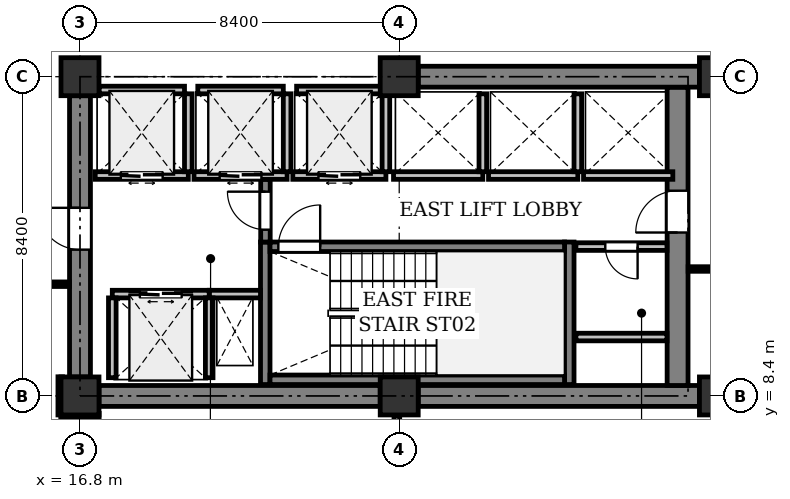
"""IFC4 building model, lengths in metres.
Left out: names, types, materials, properties, quantities, classifications, styles, units other than length and angle.
Written with IfcOpenShell. Run it as: python <this file> out.ifc"""

import sys

from ifc_helpers import new_model, si_unit, direction, frame, frame_2d, origin, origin_2d, place, context, subcontext, project, spatial, rectangle, extrude, element, fill, save


model = new_model("IFC4")
c1 = context("Model", 3, precision=1e-05, world=origin(), true_north=direction((0.0, 1.0)))
c2 = subcontext(c1, "Body", "Model", "MODEL_VIEW")
j1 = project(units=[si_unit("LENGTHUNIT", "METRE"), si_unit("PLANEANGLEUNIT", "RADIAN")], contexts=[c1])
p1 = place(None, origin())
s1 = spatial("IfcSite", under=j1, at=p1, CompositionType="ELEMENT")
p2 = place(p1, origin())
s2 = spatial("IfcBuilding", under=s1, at=p2, CompositionType="ELEMENT")
p3 = place(p2, frame((0.0, 0.0, 183.7)))
s3 = spatial("IfcBuildingStorey", under=s2, at=p3, CompositionType="ELEMENT", Elevation=183.7)
for number, where, z_axis, x_axis in (
    (1, (16.8, 8.4, 0.0), (0.0, 0.0, 1.0), (1.0, 0.0, 0.0)),
    (2, (16.8, 16.8, 0.0), (0.0, 0.0, 1.0), (1.0, 0.0, 0.0)),
    (3, (25.2, 8.4, 0.0), (0.0, 0.0, 1.0), (1.0, 0.0, 0.0)),
    (4, (25.2, 16.8, 0.0), (0.0, 0.0, 1.0), (1.0, 0.0, 0.0)),
    (5, (33.6, 8.4, 0.0), (0.0, 0.0, 1.0), (1.0, 0.0, 0.0)),
    (6, (33.6, 16.8, 0.0), (0.0, 0.0, 1.0), (1.0, 0.0, 0.0)),
):
    element("IfcColumn", number, at=place(p3, frame(where, z_axis=z_axis, x_axis=x_axis)), inside=s3, PredefinedType="COLUMN", context=c2, shape_type="SweptSolid", body=[
        extrude(rectangle(XDim=1.0, YDim=1.0, at=origin_2d()), origin(), (0.0, 0.0, 1.0), 4.1),
    ])
p4 = place(p3, frame((17.3, 8.4, 0.0), z_axis=(0.0, 0.0, 1.0), x_axis=(1.0, 0.0, 0.0)))
e7 = element("IfcWall", 7, at=p4, inside=s3, PredefinedType="SHEAR", context=c2, shape_type="SweptSolid", body=[
    extrude(rectangle(XDim=7.4, YDim=0.55, at=frame_2d((3.7, 0.0))), origin(), (0.0, 0.0, 1.0), 3.825),
])
p5 = place(p3, frame((25.7, 8.4, 0.0), z_axis=(0.0, 0.0, 1.0), x_axis=(1.0, 0.0, 0.0)))
e8 = element("IfcWall", 8, at=p5, inside=s3, PredefinedType="SHEAR", context=c2, shape_type="SweptSolid", body=[
    extrude(rectangle(XDim=7.4, YDim=0.55, at=frame_2d((3.7, 0.0))), origin(), (0.0, 0.0, 1.0), 3.825),
])
p6 = place(p3, frame((32.525, 8.675, 0.0), z_axis=(0.0, 0.0, 1.0), x_axis=(0.0, 1.0, 0.0)))
e9 = element("IfcWall", 9, at=p6, inside=s3, PredefinedType="SHEAR", context=c2, shape_type="SweptSolid", body=[
    extrude(rectangle(XDim=7.85, YDim=0.55, at=frame_2d((3.925, 0.0))), origin(), (0.0, 0.0, 1.0), 3.825),
])
p7 = place(p6, frame((4.025, 0.0, 0.0)))
e10 = element("IfcOpeningElement", 10, at=p7, cuts=e9, PredefinedType="OPENING", context=c2, shape_type="SweptSolid", body=[
    extrude(rectangle(XDim=1.1, YDim=2.15, at=frame_2d((0.55, 1.075))), frame((0.0, 0.285, 0.0), z_axis=(0.0, -1.0, 0.0), x_axis=(1.0, 0.0, 0.0)), (0.0, 0.0, 1.0), 0.57),
])
p8 = place(p3, frame((16.8, 8.9, 0.0), z_axis=(0.0, 0.0, 1.0), x_axis=(0.0, 1.0, 0.0)))
e11 = element("IfcWall", 11, at=p8, inside=s3, PredefinedType="SHEAR", context=c2, shape_type="SweptSolid", body=[
    extrude(rectangle(XDim=7.4, YDim=0.55, at=frame_2d((3.7, 0.0))), origin(), (0.0, 0.0, 1.0), 3.825),
])
p9 = place(p8, frame((3.35, 0.0, 0.0)))
e12 = element("IfcOpeningElement", 12, at=p9, cuts=e11, PredefinedType="OPENING", context=c2, shape_type="SweptSolid", body=[
    extrude(rectangle(XDim=1.1, YDim=2.15, at=frame_2d((0.55, 1.075))), frame((0.0, 0.285, 0.0), z_axis=(0.0, -1.0, 0.0), x_axis=(1.0, 0.0, 0.0)), (0.0, 0.0, 1.0), 0.57),
])
p10 = place(p3, frame((25.7, 16.8, 0.0), z_axis=(0.0, 0.0, 1.0), x_axis=(1.0, 0.0, 0.0)))
e13 = element("IfcWall", 13, at=p10, inside=s3, PredefinedType="SHEAR", context=c2, shape_type="SweptSolid", body=[
    extrude(rectangle(XDim=7.4, YDim=0.55, at=frame_2d((3.7, 0.0))), origin(), (0.0, 0.0, 1.0), 3.825),
])
for number, where, z_axis, x_axis in (
    (14, (21.675, 8.7, 0.0), (0.0, 0.0, 1.0), (0.0, 1.0, 0.0)),
    (15, (29.675, 8.7, 0.0), (0.0, 0.0, 1.0), (0.0, 1.0, 0.0)),
):
    element("IfcWall", number, at=place(p3, frame(where, z_axis=z_axis, x_axis=x_axis)), inside=s3, PredefinedType="SHEAR", context=c2, shape_type="SweptSolid", body=[
        extrude(rectangle(XDim=3.75, YDim=0.25, at=frame_2d((1.875, 0.0))), origin(), (0.0, 0.0, 1.0), 3.825),
    ])
p11 = place(p3, frame((21.8, 8.825, 0.0), z_axis=(0.0, 0.0, 1.0), x_axis=(1.0, 0.0, 0.0)))
e16 = element("IfcWall", 16, at=p11, inside=s3, PredefinedType="SHEAR", context=c2, shape_type="SweptSolid", body=[
    extrude(rectangle(XDim=7.75, YDim=0.25, at=frame_2d((3.875, 0.0))), origin(), (0.0, 0.0, 1.0), 3.825),
])
p12 = place(p3, frame((21.8, 12.325, 0.0), z_axis=(0.0, 0.0, 1.0), x_axis=(1.0, 0.0, 0.0)))
e17 = element("IfcWall", 17, at=p12, inside=s3, PredefinedType="SHEAR", context=c2, shape_type="SweptSolid", body=[
    extrude(rectangle(XDim=7.75, YDim=0.25, at=frame_2d((3.875, 0.0))), origin(), (0.0, 0.0, 1.0), 3.825),
])
p13 = place(p12, frame((0.22, 0.0, 0.0)))
e18 = element("IfcOpeningElement", 18, at=p13, cuts=e17, PredefinedType="OPENING", context=c2, shape_type="SweptSolid", body=[
    extrude(rectangle(XDim=1.1, YDim=2.15, at=frame_2d((0.55, 1.075))), frame((0.0, 0.135, 0.0), z_axis=(0.0, -1.0, 0.0), x_axis=(1.0, 0.0, 0.0)), (0.0, 0.0, 1.0), 0.27),
])
p14 = place(p3, frame((20.2, 11.08, 0.0), z_axis=(0.0, 0.0, 1.0), x_axis=(1.0, 0.0, 0.0)))
e19 = element("IfcWall", 19, at=p14, inside=s3, PredefinedType="PARTITIONING", context=c2, shape_type="SweptSolid", body=[
    extrude(rectangle(XDim=1.35, YDim=0.2, at=frame_2d((0.675, 0.0))), origin(), (0.0, 0.0, 1.0), 3.825),
])
p15 = place(p3, frame((21.68, 12.45, 0.0), z_axis=(0.0, 0.0, 1.0), x_axis=(0.0, 1.0, 0.0)))
e20 = element("IfcWall", 20, at=p15, inside=s3, PredefinedType="SHEAR", context=c2, shape_type="SweptSolid", body=[
    extrude(rectangle(XDim=1.65, YDim=0.25, at=frame_2d((0.825, 0.0))), origin(), (0.0, 0.0, 1.0), 3.825),
])
p16 = place(p15, frame((0.325, 0.0, 0.0)))
e21 = element("IfcOpeningElement", 21, at=p16, cuts=e20, PredefinedType="OPENING", context=c2, shape_type="SweptSolid", body=[
    extrude(rectangle(XDim=1.0, YDim=2.15, at=frame_2d((0.5, 1.075))), frame((0.0, 0.135, 0.0), z_axis=(0.0, -1.0, 0.0), x_axis=(1.0, 0.0, 0.0)), (0.0, 0.0, 1.0), 0.27),
])
p17 = place(p3, frame((17.65, 11.08, 0.0), z_axis=(0.0, 0.0, 1.0), x_axis=(1.0, 0.0, 0.0)))
e22 = element("IfcWall", 22, at=p17, inside=s3, PredefinedType="PARTITIONING", context=c2, shape_type="SweptSolid", body=[
    extrude(rectangle(XDim=2.55, YDim=0.2, at=frame_2d((1.275, 0.0))), origin(), (0.0, 0.0, 1.0), 3.825),
])
p18 = place(p17, frame((0.725, 0.0, 0.0)))
e23 = element("IfcOpeningElement", 23, at=p18, cuts=e22, PredefinedType="OPENING", context=c2, shape_type="SweptSolid", body=[
    extrude(rectangle(XDim=1.1, YDim=2.2, at=frame_2d((0.55, 1.1))), frame((0.0, 0.11, 0.0), z_axis=(0.0, -1.0, 0.0), x_axis=(1.0, 0.0, 0.0)), (0.0, 0.0, 1.0), 0.22),
])
for number, where, z_axis, x_axis in (
    (24, (20.2, 8.88, 0.0), (0.0, 0.0, 1.0), (0.0, 1.0, 0.0)),
    (25, (17.65, 8.88, 0.0), (0.0, 0.0, 1.0), (0.0, 1.0, 0.0)),
):
    element("IfcWall", number, at=place(p3, frame(where, z_axis=z_axis, x_axis=x_axis)), inside=s3, PredefinedType="PARTITIONING", context=c2, shape_type="SweptSolid", body=[
        extrude(rectangle(XDim=2.1, YDim=0.2, at=frame_2d((1.05, 0.0))), origin(), (0.0, 0.0, 1.0), 3.825),
    ])
p19 = place(p3, frame((17.2, 14.2, 0.0), z_axis=(0.0, 0.0, 1.0), x_axis=(1.0, 0.0, 0.0)))
e26 = element("IfcWall", 26, at=p19, inside=s3, PredefinedType="PARTITIONING", context=c2, shape_type="SweptSolid", body=[
    extrude(rectangle(XDim=2.45, YDim=0.2, at=frame_2d((1.225, 0.0))), origin(), (0.0, 0.0, 1.0), 3.825),
])
p20 = place(p19, frame((0.675, 0.0, 0.0)))
e27 = element("IfcOpeningElement", 27, at=p20, cuts=e26, PredefinedType="OPENING", context=c2, shape_type="SweptSolid", body=[
    extrude(rectangle(XDim=1.1, YDim=2.2, at=frame_2d((0.55, 1.1))), frame((0.0, 0.11, 0.0), z_axis=(0.0, -1.0, 0.0), x_axis=(1.0, 0.0, 0.0)), (0.0, 0.0, 1.0), 0.22),
])
p21 = place(p3, frame((19.65, 14.3, 0.0), z_axis=(0.0, 0.0, 1.0), x_axis=(0.0, 1.0, 0.0)))
e28 = element("IfcWall", 28, at=p21, inside=s3, PredefinedType="PARTITIONING", context=c2, shape_type="SweptSolid", body=[
    extrude(rectangle(XDim=2.05, YDim=0.2, at=frame_2d((1.025, 0.0))), origin(), (0.0, 0.0, 1.0), 3.825),
])
p22 = place(p3, frame((17.3, 16.45, 0.0), z_axis=(0.0, 0.0, 1.0), x_axis=(1.0, 0.0, 0.0)))
e29 = element("IfcWall", 29, at=p22, inside=s3, PredefinedType="PARTITIONING", context=c2, shape_type="SweptSolid", body=[
    extrude(rectangle(XDim=2.25, YDim=0.2, at=frame_2d((1.125, 0.0))), origin(), (0.0, 0.0, 1.0), 3.825),
])
p23 = place(p3, frame((19.8, 14.2, 0.0), z_axis=(0.0, 0.0, 1.0), x_axis=(1.0, 0.0, 0.0)))
e30 = element("IfcWall", 30, at=p23, inside=s3, PredefinedType="PARTITIONING", context=c2, shape_type="SweptSolid", body=[
    extrude(rectangle(XDim=2.45, YDim=0.2, at=frame_2d((1.225, 0.0))), origin(), (0.0, 0.0, 1.0), 3.825),
])
p24 = place(p23, frame((0.675, 0.0, 0.0)))
e31 = element("IfcOpeningElement", 31, at=p24, cuts=e30, PredefinedType="OPENING", context=c2, shape_type="SweptSolid", body=[
    extrude(rectangle(XDim=1.1, YDim=2.2, at=frame_2d((0.55, 1.1))), frame((0.0, 0.11, 0.0), z_axis=(0.0, -1.0, 0.0), x_axis=(1.0, 0.0, 0.0)), (0.0, 0.0, 1.0), 0.22),
])
p25 = place(p3, frame((22.25, 14.3, 0.0), z_axis=(0.0, 0.0, 1.0), x_axis=(0.0, 1.0, 0.0)))
e32 = element("IfcWall", 32, at=p25, inside=s3, PredefinedType="PARTITIONING", context=c2, shape_type="SweptSolid", body=[
    extrude(rectangle(XDim=2.05, YDim=0.2, at=frame_2d((1.025, 0.0))), origin(), (0.0, 0.0, 1.0), 3.825),
])
p26 = place(p3, frame((19.9, 16.45, 0.0), z_axis=(0.0, 0.0, 1.0), x_axis=(1.0, 0.0, 0.0)))
e33 = element("IfcWall", 33, at=p26, inside=s3, PredefinedType="PARTITIONING", context=c2, shape_type="SweptSolid", body=[
    extrude(rectangle(XDim=2.25, YDim=0.2, at=frame_2d((1.125, 0.0))), origin(), (0.0, 0.0, 1.0), 3.825),
])
p27 = place(p3, frame((22.4, 14.2, 0.0), z_axis=(0.0, 0.0, 1.0), x_axis=(1.0, 0.0, 0.0)))
e34 = element("IfcWall", 34, at=p27, inside=s3, PredefinedType="PARTITIONING", context=c2, shape_type="SweptSolid", body=[
    extrude(rectangle(XDim=2.45, YDim=0.2, at=frame_2d((1.225, 0.0))), origin(), (0.0, 0.0, 1.0), 3.825),
])
p28 = place(p27, frame((0.675, 0.0, 0.0)))
e35 = element("IfcOpeningElement", 35, at=p28, cuts=e34, PredefinedType="OPENING", context=c2, shape_type="SweptSolid", body=[
    extrude(rectangle(XDim=1.1, YDim=2.2, at=frame_2d((0.55, 1.1))), frame((0.0, 0.11, 0.0), z_axis=(0.0, -1.0, 0.0), x_axis=(1.0, 0.0, 0.0)), (0.0, 0.0, 1.0), 0.22),
])
p29 = place(p3, frame((24.85, 14.3, 0.0), z_axis=(0.0, 0.0, 1.0), x_axis=(0.0, 1.0, 0.0)))
e36 = element("IfcWall", 36, at=p29, inside=s3, PredefinedType="PARTITIONING", context=c2, shape_type="SweptSolid", body=[
    extrude(rectangle(XDim=2.05, YDim=0.2, at=frame_2d((1.025, 0.0))), origin(), (0.0, 0.0, 1.0), 3.825),
])
p30 = place(p3, frame((22.5, 16.45, 0.0), z_axis=(0.0, 0.0, 1.0), x_axis=(1.0, 0.0, 0.0)))
e37 = element("IfcWall", 37, at=p30, inside=s3, PredefinedType="PARTITIONING", context=c2, shape_type="SweptSolid", body=[
    extrude(rectangle(XDim=2.25, YDim=0.2, at=frame_2d((1.125, 0.0))), origin(), (0.0, 0.0, 1.0), 3.825),
])
p31 = place(p3, frame((25.05, 14.2, 0.0), z_axis=(0.0, 0.0, 1.0), x_axis=(1.0, 0.0, 0.0)))
e38 = element("IfcWall", 38, at=p31, inside=s3, PredefinedType="PARTITIONING", context=c2, shape_type="SweptSolid", body=[
    extrude(rectangle(XDim=2.35, YDim=0.2, at=frame_2d((1.175, 0.0))), origin(), (0.0, 0.0, 1.0), 3.825),
])
p32 = place(p3, frame((27.4, 14.3, 0.0), z_axis=(0.0, 0.0, 1.0), x_axis=(0.0, 1.0, 0.0)))
e39 = element("IfcWall", 39, at=p32, inside=s3, PredefinedType="PARTITIONING", context=c2, shape_type="SweptSolid", body=[
    extrude(rectangle(XDim=2.05, YDim=0.2, at=frame_2d((1.025, 0.0))), origin(), (0.0, 0.0, 1.0), 3.825),
])
p33 = place(p3, frame((27.55, 14.2, 0.0), z_axis=(0.0, 0.0, 1.0), x_axis=(1.0, 0.0, 0.0)))
e40 = element("IfcWall", 40, at=p33, inside=s3, PredefinedType="PARTITIONING", context=c2, shape_type="SweptSolid", body=[
    extrude(rectangle(XDim=2.35, YDim=0.2, at=frame_2d((1.175, 0.0))), origin(), (0.0, 0.0, 1.0), 3.825),
])
p34 = place(p3, frame((29.9, 14.3, 0.0), z_axis=(0.0, 0.0, 1.0), x_axis=(0.0, 1.0, 0.0)))
e41 = element("IfcWall", 41, at=p34, inside=s3, PredefinedType="PARTITIONING", context=c2, shape_type="SweptSolid", body=[
    extrude(rectangle(XDim=2.05, YDim=0.2, at=frame_2d((1.025, 0.0))), origin(), (0.0, 0.0, 1.0), 3.825),
])
p35 = place(p3, frame((30.05, 14.2, 0.0), z_axis=(0.0, 0.0, 1.0), x_axis=(1.0, 0.0, 0.0)))
e42 = element("IfcWall", 42, at=p35, inside=s3, PredefinedType="PARTITIONING", context=c2, shape_type="SweptSolid", body=[
    extrude(rectangle(XDim=2.35, YDim=0.2, at=frame_2d((1.175, 0.0))), origin(), (0.0, 0.0, 1.0), 3.825),
])
p36 = place(p3, frame((32.246, 12.33, 0.0), z_axis=(0.0, 0.0, 1.0), x_axis=(-1.0, 0.0, 0.0)))
e43 = element("IfcWall", 43, at=p36, inside=s3, PredefinedType="PARTITIONING", context=c2, shape_type="SweptSolid", body=[
    extrude(rectangle(XDim=2.396, YDim=0.2, at=frame_2d((1.198, 0.0))), origin(), (0.0, 0.0, 1.0), 3.825),
])
p37 = place(p36, frame((0.773, 0.0, 0.0)))
e44 = element("IfcOpeningElement", 44, at=p37, cuts=e43, PredefinedType="OPENING", context=c2, shape_type="SweptSolid", body=[
    extrude(rectangle(XDim=0.85, YDim=2.15, at=frame_2d((0.425, 1.075))), frame((0.0, 0.11, 0.0), z_axis=(0.0, -1.0, 0.0), x_axis=(1.0, 0.0, 0.0)), (0.0, 0.0, 1.0), 0.22),
])
p38 = place(p3, frame((29.85, 9.95, 0.0), z_axis=(0.0, 0.0, 1.0), x_axis=(1.0, 0.0, 0.0)))
e45 = element("IfcWall", 45, at=p38, inside=s3, PredefinedType="PARTITIONING", context=c2, shape_type="SweptSolid", body=[
    extrude(rectangle(XDim=2.396, YDim=0.2, at=frame_2d((1.198, 0.0))), origin(), (0.0, 0.0, 1.0), 3.825),
])
p39 = place(p3, frame((25.138, 0.195, 0.0), z_axis=(0.0, 0.0, 1.0), x_axis=(0.0, 1.0, 0.0)))
e46 = element("IfcWall", 46, at=p39, inside=s3, PredefinedType="PARTITIONING", context=c2, shape_type="SweptSolid", body=[
    extrude(rectangle(XDim=7.685, YDim=0.15, at=frame_2d((3.842, 0.0))), origin(), (0.0, 0.0, 1.0), 3.371),
])
p40 = place(p3, frame((17.304, 7.88, 0.0), z_axis=(0.0, 0.0, 1.0), x_axis=(-0.999999883085, 0.000483558938, 0.0)))
e47 = element("IfcWall", 47, at=p40, inside=s3, PredefinedType="PARTITIONING", context=c2, shape_type="SweptSolid", body=[
    extrude(rectangle(XDim=1.01, YDim=0.12, at=frame_2d((0.505, 0.0))), origin(), (0.0, 0.0, 1.0), 3.371),
])
p41 = place(p3, frame((16.28, 7.9, 0.0), z_axis=(0.0, 0.0, 1.0), x_axis=(0.000486381265, 0.999999881717, 0.0)))
e48 = element("IfcWall", 48, at=p41, inside=s3, PredefinedType="PARTITIONING", context=c2, shape_type="SweptSolid", body=[
    extrude(rectangle(XDim=1.004, YDim=0.12, at=frame_2d((0.502, 0.0))), origin(), (0.0, 0.0, 1.0), 3.365),
])
p42 = place(p3, frame((16.521, 11.34, 0.0), z_axis=(0.0, 0.0, 1.0), x_axis=(-1.0, 0.0, 0.0)))
e49 = element("IfcWall", 49, at=p42, inside=s3, PredefinedType="PARTITIONING", context=c2, shape_type="SweptSolid", body=[
    extrude(rectangle(XDim=2.121, YDim=0.12, at=frame_2d((1.061, 0.0))), origin(), (0.0, 0.0, 1.0), 3.825),
])
p43 = place(p3, frame((34.261, 11.74, 0.0), z_axis=(0.0, 0.0, 1.0), x_axis=(-1.0, 0.0, 0.0)))
e50 = element("IfcWall", 50, at=p43, inside=s3, PredefinedType="PARTITIONING", context=c2, shape_type="SweptSolid", body=[
    extrude(rectangle(XDim=1.457, YDim=0.12, at=frame_2d((0.729, 0.0))), origin(), (0.0, 0.0, 1.0), 3.371),
])
p44 = place(p7, origin())
e51 = element("IfcDoor", 51, at=p44, inside=s3, OperationType="SINGLE_SWING_LEFT", PredefinedType="DOOR", context=c2, shape_type="SweptSolid", body=[
    extrude(rectangle(XDim=1.1, YDim=2.15, at=frame_2d((0.55, 1.075))), frame((0.0, 0.025, 0.0), z_axis=(0.0, -1.0, 0.0), x_axis=(1.0, 0.0, 0.0)), (0.0, 0.0, 1.0), 0.05),
])
fill(e10, e51)
p45 = place(p9, origin())
e52 = element("IfcDoor", 52, at=p45, inside=s3, OperationType="SINGLE_SWING_RIGHT", PredefinedType="DOOR", context=c2, shape_type="SweptSolid", body=[
    extrude(rectangle(XDim=1.1, YDim=2.15, at=frame_2d((0.55, 1.075))), frame((0.0, 0.025, 0.0), z_axis=(0.0, -1.0, 0.0), x_axis=(1.0, 0.0, 0.0)), (0.0, 0.0, 1.0), 0.05),
])
fill(e12, e52)
p46 = place(p13, origin())
e53 = element("IfcDoor", 53, at=p46, inside=s3, OperationType="SINGLE_SWING_RIGHT", PredefinedType="DOOR", context=c2, shape_type="SweptSolid", body=[
    extrude(rectangle(XDim=1.1, YDim=2.15, at=frame_2d((0.55, 1.075))), frame((0.0, 0.025, 0.0), z_axis=(0.0, -1.0, 0.0), x_axis=(1.0, 0.0, 0.0)), (0.0, 0.0, 1.0), 0.05),
])
fill(e18, e53)
p47 = place(p16, origin())
e54 = element("IfcDoor", 54, at=p47, inside=s3, OperationType="SINGLE_SWING_RIGHT", PredefinedType="DOOR", context=c2, shape_type="SweptSolid", body=[
    extrude(rectangle(XDim=1.0, YDim=2.15, at=frame_2d((0.5, 1.075))), frame((0.0, 0.025, 0.0), z_axis=(0.0, -1.0, 0.0), x_axis=(1.0, 0.0, 0.0)), (0.0, 0.0, 1.0), 0.05),
])
fill(e21, e54)
p48 = place(p18, origin())
e55 = element("IfcDoor", 55, at=p48, inside=s3, OperationType="DOUBLE_DOOR_SLIDING", PredefinedType="DOOR", context=c2, shape_type="SweptSolid", body=[
    extrude(rectangle(XDim=1.1, YDim=2.2, at=frame_2d((0.55, 1.1))), frame((0.0, 0.025, 0.0), z_axis=(0.0, -1.0, 0.0), x_axis=(1.0, 0.0, 0.0)), (0.0, 0.0, 1.0), 0.05),
])
fill(e23, e55)
p49 = place(p20, origin())
e56 = element("IfcDoor", 56, at=p49, inside=s3, OperationType="DOUBLE_DOOR_SLIDING", PredefinedType="DOOR", context=c2, shape_type="SweptSolid", body=[
    extrude(rectangle(XDim=1.1, YDim=2.2, at=frame_2d((0.55, 1.1))), frame((0.0, 0.025, 0.0), z_axis=(0.0, -1.0, 0.0), x_axis=(1.0, 0.0, 0.0)), (0.0, 0.0, 1.0), 0.05),
])
fill(e27, e56)
p50 = place(p24, origin())
e57 = element("IfcDoor", 57, at=p50, inside=s3, OperationType="DOUBLE_DOOR_SLIDING", PredefinedType="DOOR", context=c2, shape_type="SweptSolid", body=[
    extrude(rectangle(XDim=1.1, YDim=2.2, at=frame_2d((0.55, 1.1))), frame((0.0, 0.025, 0.0), z_axis=(0.0, -1.0, 0.0), x_axis=(1.0, 0.0, 0.0)), (0.0, 0.0, 1.0), 0.05),
])
fill(e31, e57)
p51 = place(p28, origin())
e58 = element("IfcDoor", 58, at=p51, inside=s3, OperationType="DOUBLE_DOOR_SLIDING", PredefinedType="DOOR", context=c2, shape_type="SweptSolid", body=[
    extrude(rectangle(XDim=1.1, YDim=2.2, at=frame_2d((0.55, 1.1))), frame((0.0, 0.025, 0.0), z_axis=(0.0, -1.0, 0.0), x_axis=(1.0, 0.0, 0.0)), (0.0, 0.0, 1.0), 0.05),
])
fill(e35, e58)
p52 = place(p37, origin())
e59 = element("IfcDoor", 59, at=p52, inside=s3, OperationType="SINGLE_SWING_LEFT", PredefinedType="DOOR", context=c2, shape_type="SweptSolid", body=[
    extrude(rectangle(XDim=0.85, YDim=2.15, at=frame_2d((0.425, 1.075))), frame((0.0, 0.025, 0.0), z_axis=(0.0, -1.0, 0.0), x_axis=(1.0, 0.0, 0.0)), (0.0, 0.0, 1.0), 0.05),
])
fill(e44, e59)
save(model, sys.argv[1])
